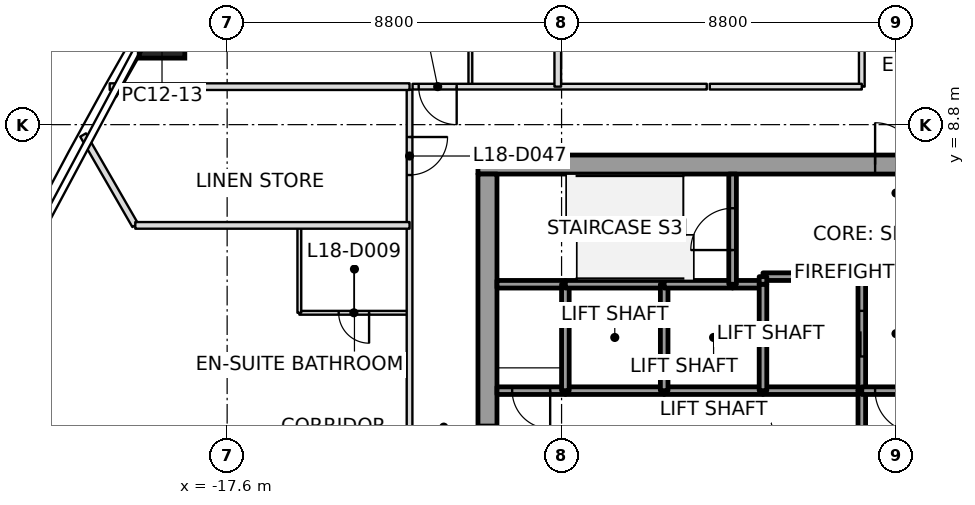
"""IFC4 building model, lengths in metres.
Left out: names, types, materials, properties, quantities, classifications, styles, units other than length and angle.
Written with IfcOpenShell. Run it as: python <this file> out.ifc"""

import sys

from ifc_helpers import new_model, si_unit, direction, frame, frame_2d, origin, origin_2d, place, context, subcontext, project, spatial, rectangle, extrude, element, fill, save


model = new_model("IFC4")
c1 = context("Model", 3, precision=1e-05, world=origin(), true_north=direction((0.0, 1.0)))
c2 = subcontext(c1, "Body", "Model", "MODEL_VIEW")
j1 = project(units=[si_unit("LENGTHUNIT", "METRE"), si_unit("PLANEANGLEUNIT", "RADIAN")], contexts=[c1])
p1 = place(None, origin())
s1 = spatial("IfcSite", under=j1, at=p1, CompositionType="ELEMENT")
p2 = place(p1, origin())
s2 = spatial("IfcBuilding", under=s1, at=p2, CompositionType="ELEMENT")
p3 = place(p2, frame((0.0, 0.0, 88.7)))
s3 = spatial("IfcBuildingStorey", under=s2, at=p3, CompositionType="ELEMENT", Elevation=88.7)
p4 = place(p3, frame((-19.314, 11.151, 0.0), z_axis=(0.010754701703, -0.006136118149, 0.999923339284), x_axis=(0.499971083262, 0.866042095943, -6.290806e-05)))
e1 = element("IfcColumn", 1, at=p4, inside=s3, PredefinedType="COLUMN", context=c2, shape_type="SweptSolid", body=[
    extrude(rectangle(XDim=1.2, YDim=1.2, at=origin_2d()), origin(), (0.0, 0.0, 1.0), 3.7),
])
p5 = place(p3, frame((-11.0, 7.75, 0.0), z_axis=(0.0, 0.0, 1.0), x_axis=(1.0, 0.0, 0.0)))
e2 = element("IfcWall", 2, at=p5, inside=s3, PredefinedType="SHEAR", context=c2, shape_type="SweptSolid", body=[
    extrude(rectangle(XDim=22.0, YDim=0.5, at=frame_2d((11.0, 0.0))), origin(), (0.0, 0.0, 1.0), 3.7),
])
p6 = place(p5, frame((10.45, 0.0, 0.0)))
e3 = element("IfcOpeningElement", 3, at=p6, cuts=e2, PredefinedType="OPENING", context=c2, shape_type="SweptSolid", body=[
    extrude(rectangle(XDim=1.1, YDim=2.1, at=frame_2d((0.55, 1.05))), frame((0.0, 0.25, 0.0), z_axis=(0.0, -1.0, 0.0), x_axis=(1.0, 0.0, 0.0)), (0.0, 0.0, 1.0), 0.5),
])
p7 = place(p3, frame((-10.75, -7.5, 0.0), z_axis=(0.0, 0.0, 1.0), x_axis=(0.0, 1.0, 0.0)))
e4 = element("IfcWall", 4, at=p7, inside=s3, PredefinedType="SHEAR", context=c2, shape_type="SweptSolid", body=[
    extrude(rectangle(XDim=15.0, YDim=0.5, at=frame_2d((7.5, 0.0))), origin(), (0.0, 0.0, 1.0), 3.7),
])
p8 = place(p7, frame((6.6, 0.0, 0.0)))
e5 = element("IfcOpeningElement", 5, at=p8, cuts=e4, PredefinedType="OPENING", context=c2, shape_type="SweptSolid", body=[
    extrude(rectangle(XDim=1.8, YDim=2.1, at=frame_2d((0.9, 1.05))), frame((0.0, 0.25, 0.0), z_axis=(0.0, -1.0, 0.0), x_axis=(1.0, 0.0, 0.0)), (0.0, 0.0, 1.0), 0.5),
])
p9 = place(p3, frame((-8.7, 1.8, 0.0), z_axis=(0.0, 0.0, 1.0), x_axis=(-1.0, 0.0, 0.0)))
e6 = element("IfcWall", 6, at=p9, inside=s3, PredefinedType="SOLIDWALL", context=c2, shape_type="SweptSolid", body=[
    extrude(rectangle(XDim=1.8, YDim=0.2, at=frame_2d((0.9, 0.0))), origin(), (0.0, 0.0, 1.0), 3.55),
])
p10 = place(p9, frame((0.4, 0.0, 0.0)))
e7 = element("IfcOpeningElement", 7, at=p10, cuts=e6, PredefinedType="OPENING", context=c2, shape_type="SweptSolid", body=[
    extrude(rectangle(XDim=1.0, YDim=2.1, at=frame_2d((0.5, 1.05))), frame((0.0, 0.1, 0.0), z_axis=(0.0, -1.0, 0.0), x_axis=(1.0, 0.0, 0.0)), (0.0, 0.0, 1.0), 0.2),
])
p11 = place(p3, frame((-8.7, 4.6, 0.0), z_axis=(0.0, 0.0, 1.0), x_axis=(-1.0, 0.0, 0.0)))
e8 = element("IfcWall", 8, at=p11, inside=s3, PredefinedType="SOLIDWALL", context=c2, shape_type="SweptSolid", body=[
    extrude(rectangle(XDim=1.8, YDim=0.2, at=frame_2d((0.9, 0.0))), origin(), (0.0, 0.0, 1.0), 3.55),
])
p12 = place(p3, frame((-6.1, 1.8, 0.0), z_axis=(0.0, 0.0, 1.0), x_axis=(-1.0, 0.0, 0.0)))
e9 = element("IfcWall", 9, at=p12, inside=s3, PredefinedType="SOLIDWALL", context=c2, shape_type="SweptSolid", body=[
    extrude(rectangle(XDim=2.6, YDim=0.2, at=frame_2d((1.3, 0.0))), origin(), (0.0, 0.0, 1.0), 3.55),
])
p13 = place(p3, frame((-8.7, 1.8, 0.0), z_axis=(0.0, 0.0, 1.0), x_axis=(0.0, 1.0, 0.0)))
e10 = element("IfcWall", 10, at=p13, inside=s3, PredefinedType="SOLIDWALL", context=c2, shape_type="SweptSolid", body=[
    extrude(rectangle(XDim=2.8, YDim=0.2, at=frame_2d((1.4, 0.0))), origin(), (0.0, 0.0, 1.0), 3.55),
])
p14 = place(p3, frame((-6.1, 4.6, 0.0), z_axis=(0.0, 0.0, 1.0), x_axis=(-1.0, 0.0, 0.0)))
e11 = element("IfcWall", 11, at=p14, inside=s3, PredefinedType="SOLIDWALL", context=c2, shape_type="SweptSolid", body=[
    extrude(rectangle(XDim=2.6, YDim=0.2, at=frame_2d((1.3, 0.0))), origin(), (0.0, 0.0, 1.0), 3.55),
])
p15 = place(p3, frame((-3.5, 1.8, 0.0), z_axis=(0.0, 0.0, 1.0), x_axis=(-1.0, 0.0, 0.0)))
e12 = element("IfcWall", 12, at=p15, inside=s3, PredefinedType="SOLIDWALL", context=c2, shape_type="SweptSolid", body=[
    extrude(rectangle(XDim=2.6, YDim=0.2, at=frame_2d((1.3, 0.0))), origin(), (0.0, 0.0, 1.0), 3.55),
])
p16 = place(p3, frame((-6.1, 1.8, 0.0), z_axis=(0.0, 0.0, 1.0), x_axis=(0.0, 1.0, 0.0)))
e13 = element("IfcWall", 13, at=p16, inside=s3, PredefinedType="SOLIDWALL", context=c2, shape_type="SweptSolid", body=[
    extrude(rectangle(XDim=2.8, YDim=0.2, at=frame_2d((1.4, 0.0))), origin(), (0.0, 0.0, 1.0), 3.55),
])
p17 = place(p3, frame((-4.3, 4.6, 0.0), z_axis=(0.0, 0.0, 1.0), x_axis=(-1.0, 0.0, 0.0)))
e14 = element("IfcWall", 14, at=p17, inside=s3, PredefinedType="SOLIDWALL", context=c2, shape_type="SweptSolid", body=[
    extrude(rectangle(XDim=1.8, YDim=0.2, at=frame_2d((0.9, 0.0))), origin(), (0.0, 0.0, 1.0), 3.55),
])
p18 = place(p3, frame((-3.5, 4.6, 0.0), z_axis=(0.0, 0.0, 1.0), x_axis=(-1.0, 0.0, 0.0)))
e15 = element("IfcWall", 15, at=p18, inside=s3, PredefinedType="SOLIDWALL", context=c2, shape_type="SweptSolid", body=[
    extrude(rectangle(XDim=0.8, YDim=0.2, at=frame_2d((0.4, 0.0))), origin(), (0.0, 0.0, 1.0), 3.55),
])
p19 = place(p3, frame((-4.3, 4.6, 0.0), z_axis=(0.0, 0.0, 1.0), x_axis=(0.0, 1.0, 0.0)))
e16 = element("IfcWall", 16, at=p19, inside=s3, PredefinedType="SOLIDWALL", context=c2, shape_type="SweptSolid", body=[
    extrude(rectangle(XDim=2.9, YDim=0.2, at=frame_2d((1.45, 0.0))), origin(), (0.0, 0.0, 1.0), 3.55),
])
p20 = place(p19, frame((0.9, 0.0, 0.0)))
e17 = element("IfcOpeningElement", 17, at=p20, cuts=e16, PredefinedType="OPENING", context=c2, shape_type="SweptSolid", body=[
    extrude(rectangle(XDim=1.1, YDim=2.1, at=frame_2d((0.55, 1.05))), frame((0.0, 0.1, 0.0), z_axis=(0.0, -1.0, 0.0), x_axis=(1.0, 0.0, 0.0)), (0.0, 0.0, 1.0), 0.2),
])
p21 = place(p3, frame((-0.9, 1.8, 0.0), z_axis=(0.0, 0.0, 1.0), x_axis=(-1.0, 0.0, 0.0)))
e18 = element("IfcWall", 18, at=p21, inside=s3, PredefinedType="SOLIDWALL", context=c2, shape_type="SweptSolid", body=[
    extrude(rectangle(XDim=2.6, YDim=0.2, at=frame_2d((1.3, 0.0))), origin(), (0.0, 0.0, 1.0), 3.55),
])
p22 = place(p3, frame((-3.5, 4.6, 0.0), z_axis=(0.0, 0.0, 1.0), x_axis=(0.0, -1.0, 0.0)))
e19 = element("IfcWall", 19, at=p22, inside=s3, PredefinedType="SOLIDWALL", context=c2, shape_type="SweptSolid", body=[
    extrude(rectangle(XDim=2.8, YDim=0.2, at=frame_2d((1.4, 0.0))), origin(), (0.0, 0.0, 1.0), 3.55),
])
p23 = place(p3, frame((-0.9, 1.8, 0.0), z_axis=(0.0, 0.0, 1.0), x_axis=(0.0, 1.0, 0.0)))
e20 = element("IfcWall", 20, at=p23, inside=s3, PredefinedType="SOLIDWALL", context=c2, shape_type="SweptSolid", body=[
    extrude(rectangle(XDim=3.0, YDim=0.2, at=frame_2d((1.5, 0.0))), origin(), (0.0, 0.0, 1.0), 3.55),
])
p24 = place(p23, frame((0.9, 0.0, 0.0)))
e21 = element("IfcOpeningElement", 21, at=p24, cuts=e20, PredefinedType="OPENING", context=c2, shape_type="SweptSolid", body=[
    extrude(rectangle(XDim=1.2, YDim=2.1, at=frame_2d((0.6, 1.05))), frame((0.0, 0.1, 0.0), z_axis=(0.0, -1.0, 0.0), x_axis=(1.0, 0.0, 0.0)), (0.0, 0.0, 1.0), 0.2),
])
p25 = place(p3, frame((-0.9, 4.8, 0.0), z_axis=(0.0, 0.0, 1.0), x_axis=(-1.0, 0.0, 0.0)))
e22 = element("IfcWall", 22, at=p25, inside=s3, PredefinedType="SOLIDWALL", context=c2, shape_type="SweptSolid", body=[
    extrude(rectangle(XDim=2.6, YDim=0.2, at=frame_2d((1.3, 0.0))), origin(), (0.0, 0.0, 1.0), 3.55),
])
p26 = place(p3, frame((-3.5, 4.8, 0.0), z_axis=(0.0, 0.0, 1.0), x_axis=(0.0, -1.0, 0.0)))
e23 = element("IfcWall", 23, at=p26, inside=s3, PredefinedType="SOLIDWALL", context=c2, shape_type="SweptSolid", body=[
    extrude(rectangle(XDim=0.2, YDim=0.2, at=frame_2d((0.1, 0.0))), origin(), (0.0, 0.0, 1.0), 3.55),
])
p27 = place(p3, frame((-0.9, 1.8, 0.0), z_axis=(0.0, 0.0, 1.0), x_axis=(0.0, -1.0, 0.0)))
e24 = element("IfcWall", 24, at=p27, inside=s3, PredefinedType="SOLIDWALL", context=c2, shape_type="SweptSolid", body=[
    extrude(rectangle(XDim=3.6, YDim=0.2, at=frame_2d((1.8, 0.0))), origin(), (0.0, 0.0, 1.0), 3.55),
])
p28 = place(p27, frame((1.05, 0.0, 0.0)))
e25 = element("IfcOpeningElement", 25, at=p28, cuts=e24, PredefinedType="OPENING", context=c2, shape_type="SweptSolid", body=[
    extrude(rectangle(XDim=1.5, YDim=2.1, at=frame_2d((0.75, 1.05))), frame((0.0, 0.1, 0.0), z_axis=(0.0, -1.0, 0.0), x_axis=(1.0, 0.0, 0.0)), (0.0, 0.0, 1.0), 0.2),
])
p29 = place(p3, frame((0.9, 1.8, 0.0), z_axis=(0.0, 0.0, 1.0), x_axis=(-1.0, 0.0, 0.0)))
e26 = element("IfcWall", 26, at=p29, inside=s3, PredefinedType="SOLIDWALL", context=c2, shape_type="SweptSolid", body=[
    extrude(rectangle(XDim=1.8, YDim=0.2, at=frame_2d((0.9, 0.0))), origin(), (0.0, 0.0, 1.0), 3.55),
])
p30 = place(p29, frame((0.35, 0.0, 0.0)))
e27 = element("IfcOpeningElement", 27, at=p30, cuts=e26, PredefinedType="OPENING", context=c2, shape_type="SweptSolid", body=[
    extrude(rectangle(XDim=1.1, YDim=2.1, at=frame_2d((0.55, 1.05))), frame((0.0, 0.1, 0.0), z_axis=(0.0, -1.0, 0.0), x_axis=(1.0, 0.0, 0.0)), (0.0, 0.0, 1.0), 0.2),
])
p31 = place(p3, frame((-21.39, 8.528, 0.0), z_axis=(0.0, 0.0, 1.0), x_axis=(0.500058417122, -0.865991674016, 0.0)))
e28 = element("IfcWall", 28, at=p31, inside=s3, PredefinedType="PARTITIONING", context=c2, shape_type="SweptSolid", body=[
    extrude(rectangle(XDim=2.747, YDim=0.175, at=frame_2d((1.374, 0.0))), origin(), (0.0, 0.0, 1.0), 2.934),
])
p32 = place(p3, frame((-20.017, 6.149, 0.0), z_axis=(0.0, 0.0, 1.0), x_axis=(1.0, 0.0, 0.0)))
e29 = element("IfcWall", 29, at=p32, inside=s3, PredefinedType="PARTITIONING", context=c2, shape_type="SweptSolid", body=[
    extrude(rectangle(XDim=7.217, YDim=0.175, at=frame_2d((3.608, 0.0))), origin(), (0.0, 0.0, 1.0), 3.093),
])
p33 = place(p3, frame((-12.8, 9.8, 0.0), z_axis=(0.0, 0.0, 1.0), x_axis=(-1.0, 0.0, 0.0)))
e30 = element("IfcWall", 30, at=p33, inside=s3, PredefinedType="PARTITIONING", context=c2, shape_type="SweptSolid", body=[
    extrude(rectangle(XDim=7.89, YDim=0.175, at=frame_2d((3.945, 0.0))), origin(), (0.0, 0.0, 1.0), 2.934),
])
p34 = place(p3, frame((-8.9, 9.8, 0.0), z_axis=(0.0, 0.0, 1.0), x_axis=(0.0, 1.0, 0.0)))
e31 = element("IfcWall", 31, at=p34, inside=s3, PredefinedType="PARTITIONING", context=c2, shape_type="SweptSolid", body=[
    extrude(rectangle(XDim=17.69, YDim=0.175, at=frame_2d((8.845, 0.0))), origin(), (0.0, 0.0, 1.0), 2.947),
])
p35 = place(p3, frame((-12.8, 9.72, 0.0), z_axis=(0.0, 0.0, 1.0), x_axis=(0.0, -1.0, 0.0)))
e32 = element("IfcWall", 32, at=p35, inside=s3, PredefinedType="PARTITIONING", context=c2, shape_type="SweptSolid", body=[
    extrude(rectangle(XDim=16.071, YDim=0.15, at=frame_2d((8.035, 0.0))), origin(), (0.0, 0.0, 1.0), 2.947),
])
p36 = place(p35, frame((1.245, 0.0, 0.0)))
e33 = element("IfcOpeningElement", 33, at=p36, cuts=e32, PredefinedType="OPENING", context=c2, shape_type="SweptSolid", body=[
    extrude(rectangle(XDim=1.0, YDim=2.1, at=frame_2d((0.5, 1.05))), frame((0.0, 0.075, 0.0), z_axis=(0.0, -1.0, 0.0), x_axis=(1.0, 0.0, 0.0)), (0.0, 0.0, 1.0), 0.15),
])
p37 = place(p35, frame((10.521, 0.0, 0.0)))
e34 = element("IfcOpeningElement", 34, at=p37, cuts=e32, PredefinedType="OPENING", context=c2, shape_type="SweptSolid", body=[
    extrude(rectangle(XDim=1.0, YDim=2.1, at=frame_2d((0.5, 1.05))), frame((0.0, 0.075, 0.0), z_axis=(0.0, -1.0, 0.0), x_axis=(1.0, 0.0, 0.0)), (0.0, 0.0, 1.0), 0.15),
])
p38 = place(p3, frame((-4.98, 9.8, 0.0), z_axis=(0.0, 0.0, 1.0), x_axis=(-1.0, 0.0, 0.0)))
e35 = element("IfcWall", 35, at=p38, inside=s3, PredefinedType="PARTITIONING", context=c2, shape_type="SweptSolid", body=[
    extrude(rectangle(XDim=7.74, YDim=0.15, at=frame_2d((3.87, 0.0))), origin(), (0.0, 0.0, 1.0), 2.947),
])
p39 = place(p38, frame((6.58, 0.0, 0.0)))
e36 = element("IfcOpeningElement", 36, at=p39, cuts=e35, PredefinedType="OPENING", context=c2, shape_type="SweptSolid", body=[
    extrude(rectangle(XDim=1.0, YDim=2.1, at=frame_2d((0.5, 1.05))), frame((0.0, 0.075, 0.0), z_axis=(0.0, -1.0, 0.0), x_axis=(1.0, 0.0, 0.0)), (0.0, 0.0, 1.0), 0.15),
])
p40 = place(p3, frame((-0.9, 26.32, 0.0), z_axis=(0.0, 0.0, 1.0), x_axis=(0.0, -1.0, 0.0)))
e37 = element("IfcWall", 37, at=p40, inside=s3, PredefinedType="PARTITIONING", context=c2, shape_type="SweptSolid", body=[
    extrude(rectangle(XDim=16.52, YDim=0.15, at=frame_2d((8.26, 0.0))), origin(), (0.0, 0.0, 1.0), 2.947),
])
p41 = place(p40, frame((8.96, 0.0, 0.0)))
e38 = element("IfcOpeningElement", 38, at=p41, cuts=e37, PredefinedType="OPENING", context=c2, shape_type="SweptSolid", body=[
    extrude(rectangle(XDim=1.0, YDim=2.1, at=frame_2d((0.5, 1.05))), frame((0.0, 0.075, 0.0), z_axis=(0.0, -1.0, 0.0), x_axis=(1.0, 0.0, 0.0)), (0.0, 0.0, 1.0), 0.15),
])
p42 = place(p3, frame((-0.9, 9.8, 0.0), z_axis=(0.0, 0.0, 1.0), x_axis=(-1.0, 0.0, 0.0)))
e39 = element("IfcWall", 39, at=p42, inside=s3, PredefinedType="PARTITIONING", context=c2, shape_type="SweptSolid", body=[
    extrude(rectangle(XDim=4.0, YDim=0.15, at=frame_2d((2.0, 0.0))), origin(), (0.0, 0.0, 1.0), 3.15),
])
p43 = place(p3, frame((-12.83, 3.849, 0.0), z_axis=(0.0, 0.0, 1.0), x_axis=(-1.0, 0.0, 0.0)))
e40 = element("IfcWall", 40, at=p43, inside=s3, PredefinedType="PARTITIONING", context=c2, shape_type="SweptSolid", body=[
    extrude(rectangle(XDim=2.87, YDim=0.1, at=frame_2d((1.435, 0.0))), origin(), (0.0, 0.0, 1.0), 3.15),
])
p44 = place(p43, frame((1.035, 0.0, 0.0)))
e41 = element("IfcOpeningElement", 41, at=p44, cuts=e40, PredefinedType="OPENING", context=c2, shape_type="SweptSolid", body=[
    extrude(rectangle(XDim=0.8, YDim=2.1, at=frame_2d((0.4, 1.05))), frame((0.0, 0.05, 0.0), z_axis=(0.0, -1.0, 0.0), x_axis=(1.0, 0.0, 0.0)), (0.0, 0.0, 1.0), 0.1),
])
p45 = place(p3, frame((-15.7, 3.849, 0.0), z_axis=(0.0, 0.0, 1.0), x_axis=(0.0, 1.0, 0.0)))
e42 = element("IfcWall", 42, at=p45, inside=s3, PredefinedType="PARTITIONING", context=c2, shape_type="SweptSolid", body=[
    extrude(rectangle(XDim=2.27, YDim=0.1, at=frame_2d((1.135, 0.0))), origin(), (0.0, 0.0, 1.0), 3.15),
])
p46 = place(p3, frame((-11.2, 9.83, 0.0), z_axis=(0.0, 0.0, 1.0), x_axis=(0.0, 1.0, 0.0)))
e43 = element("IfcWall", 43, at=p46, inside=s3, PredefinedType="PARTITIONING", context=c2, shape_type="SweptSolid", body=[
    extrude(rectangle(XDim=2.87, YDim=0.1, at=frame_2d((1.435, 0.0))), origin(), (0.0, 0.0, 1.0), 2.947),
])
p47 = place(p46, frame((1.035, 0.0, 0.0)))
e44 = element("IfcOpeningElement", 44, at=p47, cuts=e43, PredefinedType="OPENING", context=c2, shape_type="SweptSolid", body=[
    extrude(rectangle(XDim=0.8, YDim=2.1, at=frame_2d((0.4, 1.05))), frame((0.0, 0.05, 0.0), z_axis=(0.0, -1.0, 0.0), x_axis=(1.0, 0.0, 0.0)), (0.0, 0.0, 1.0), 0.1),
])
p48 = place(p39, origin())
e45 = element("IfcDoor", 45, at=p48, inside=s3, OperationType="SINGLE_SWING_RIGHT", PredefinedType="DOOR", context=c2, shape_type="SweptSolid", body=[
    extrude(rectangle(XDim=1.0, YDim=2.1, at=frame_2d((0.5, 1.05))), frame((0.0, 0.025, 0.0), z_axis=(0.0, -1.0, 0.0), x_axis=(1.0, 0.0, 0.0)), (0.0, 0.0, 1.0), 0.05),
])
fill(e36, e45)
p49 = place(p36, origin())
e46 = element("IfcDoor", 46, at=p49, inside=s3, OperationType="SINGLE_SWING_LEFT", PredefinedType="DOOR", context=c2, shape_type="SweptSolid", body=[
    extrude(rectangle(XDim=1.0, YDim=2.1, at=frame_2d((0.5, 1.05))), frame((0.0, 0.025, 0.0), z_axis=(0.0, -1.0, 0.0), x_axis=(1.0, 0.0, 0.0)), (0.0, 0.0, 1.0), 0.05),
])
fill(e33, e46)
p50 = place(p44, origin())
e47 = element("IfcDoor", 47, at=p50, inside=s3, OperationType="SINGLE_SWING_LEFT", PredefinedType="DOOR", context=c2, shape_type="SweptSolid", body=[
    extrude(rectangle(XDim=0.8, YDim=2.1, at=frame_2d((0.4, 1.05))), frame((0.0, 0.025, 0.0), z_axis=(0.0, -1.0, 0.0), x_axis=(1.0, 0.0, 0.0)), (0.0, 0.0, 1.0), 0.05),
])
fill(e41, e47)
p51 = place(p24, origin())
e48 = element("IfcDoor", 48, at=p51, inside=s3, OperationType="SLIDING_TO_LEFT", PredefinedType="DOOR", context=c2, shape_type="SweptSolid", body=[
    extrude(rectangle(XDim=1.2, YDim=2.1, at=frame_2d((0.6, 1.05))), frame((0.0, 0.025, 0.0), z_axis=(0.0, -1.0, 0.0), x_axis=(1.0, 0.0, 0.0)), (0.0, 0.0, 1.0), 0.05),
])
fill(e21, e48)
p52 = place(p30, origin())
e49 = element("IfcDoor", 49, at=p52, inside=s3, OperationType="SINGLE_SWING_LEFT", PredefinedType="DOOR", context=c2, shape_type="SweptSolid", body=[
    extrude(rectangle(XDim=1.1, YDim=2.1, at=frame_2d((0.55, 1.05))), frame((0.0, 0.025, 0.0), z_axis=(0.0, -1.0, 0.0), x_axis=(1.0, 0.0, 0.0)), (0.0, 0.0, 1.0), 0.05),
])
fill(e27, e49)
p53 = place(p10, origin())
e50 = element("IfcDoor", 50, at=p53, inside=s3, OperationType="SINGLE_SWING_RIGHT", PredefinedType="DOOR", context=c2, shape_type="SweptSolid", body=[
    extrude(rectangle(XDim=1.0, YDim=2.1, at=frame_2d((0.5, 1.05))), frame((0.0, 0.025, 0.0), z_axis=(0.0, -1.0, 0.0), x_axis=(1.0, 0.0, 0.0)), (0.0, 0.0, 1.0), 0.05),
])
fill(e7, e50)
p54 = place(p20, origin())
e51 = element("IfcDoor", 51, at=p54, inside=s3, OperationType="SINGLE_SWING_RIGHT", PredefinedType="DOOR", context=c2, shape_type="SweptSolid", body=[
    extrude(rectangle(XDim=1.1, YDim=2.1, at=frame_2d((0.55, 1.05))), frame((0.0, 0.025, 0.0), z_axis=(0.0, -1.0, 0.0), x_axis=(1.0, 0.0, 0.0)), (0.0, 0.0, 1.0), 0.05),
])
fill(e17, e51)
p55 = place(p8, origin())
e52 = element("IfcDoor", 52, at=p55, inside=s3, OperationType="DOUBLE_DOOR_SINGLE_SWING", PredefinedType="DOOR", context=c2, shape_type="SweptSolid", body=[
    extrude(rectangle(XDim=1.8, YDim=2.1, at=frame_2d((0.9, 1.05))), frame((0.0, 0.025, 0.0), z_axis=(0.0, -1.0, 0.0), x_axis=(1.0, 0.0, 0.0)), (0.0, 0.0, 1.0), 0.05),
])
fill(e5, e52)
p56 = place(p6, origin())
e53 = element("IfcDoor", 53, at=p56, inside=s3, OperationType="SINGLE_SWING_RIGHT", PredefinedType="DOOR", context=c2, shape_type="SweptSolid", body=[
    extrude(rectangle(XDim=1.1, YDim=2.1, at=frame_2d((0.55, 1.05))), frame((0.0, 0.025, 0.0), z_axis=(0.0, -1.0, 0.0), x_axis=(1.0, 0.0, 0.0)), (0.0, 0.0, 1.0), 0.05),
])
fill(e3, e53)
save(model, sys.argv[1])
